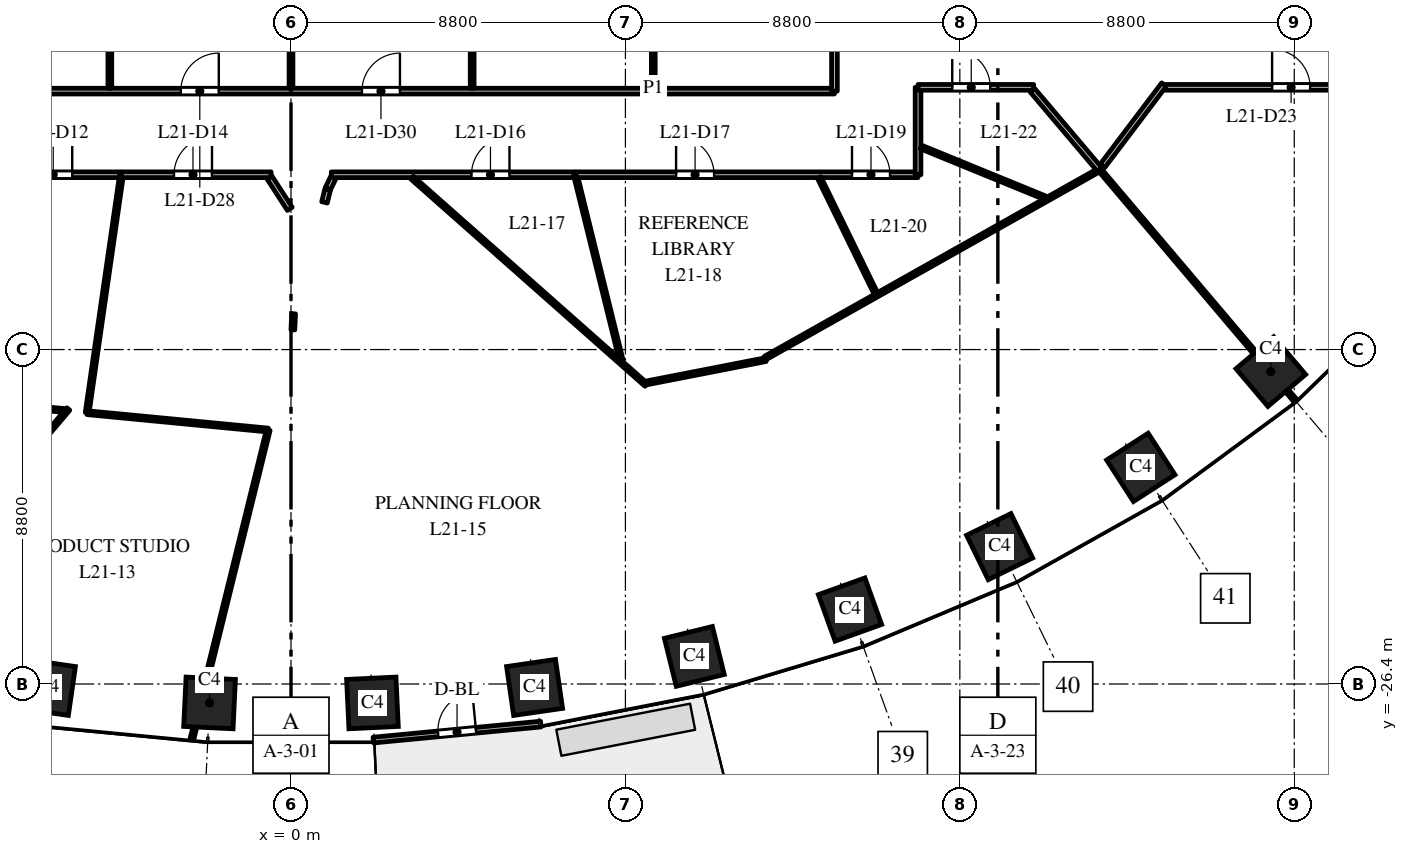
"""IFC4 building model, lengths in metres.
Left out: names, types, materials, properties, quantities, classifications, styles, units other than length and angle.
Written with IfcOpenShell. Run it as: python <this file> out.ifc"""

import sys

from ifc_helpers import new_model, si_unit, direction, frame, frame_2d, origin, origin_2d, place, context, subcontext, project, spatial, rectangle, extrude, element, fill, save


model = new_model("IFC4")
c1 = context("Model", 3, precision=1e-05, world=origin(), true_north=direction((0.0, 1.0)))
c2 = subcontext(c1, "Body", "Model", "MODEL_VIEW")
j1 = project(units=[si_unit("LENGTHUNIT", "METRE"), si_unit("PLANEANGLEUNIT", "RADIAN")], contexts=[c1])
p1 = place(None, origin())
s1 = spatial("IfcSite", under=j1, at=p1, CompositionType="ELEMENT")
p2 = place(p1, origin())
s2 = spatial("IfcBuilding", under=s1, at=p2, CompositionType="ELEMENT")
p3 = place(p2, frame((0.0, 0.0, 96.0)))
s3 = spatial("IfcBuildingStorey", under=s2, at=p3, CompositionType="ELEMENT", Elevation=96.0)
for number, where, z_axis, x_axis in (
    (1, (-6.409, -26.491, 0.0), (0.0, 0.0, 1.0), (0.99, -0.143, 0.0)),
    (2, (-2.143, -26.898, 0.0), (0.0, 0.0, 1.0), (0.999, -0.048, 0.0)),
    (3, (2.143, -26.898, 0.0), (0.0, 0.0, 1.0), (0.999, 0.048, 0.0)),
    (4, (6.409, -26.491, 0.0), (0.0, 0.0, 1.0), (0.99, 0.143, 0.0)),
    (5, (10.613, -25.674, 0.0), (0.0, 0.0, 1.0), (0.971, 0.24, 0.0)),
    (6, (14.709, -24.441, 0.0), (0.0, 0.0, 1.0), (0.941, 0.338, 0.0)),
    (7, (18.646, -22.785, 0.0), (0.0, 0.0, 1.0), (0.898, 0.439, 0.0)),
    (8, (22.362, -20.7, 0.0), (0.0, 0.0, 1.0), (0.84, 0.542, 0.0)),
    (9, (25.783, -18.18, 0.0), (0.0, 0.0, 1.0), (0.763, 0.646, 0.0)),
):
    element("IfcColumn", number, at=place(p3, frame(where, z_axis=z_axis, x_axis=x_axis)), inside=s3, PredefinedType="COLUMN", context=c2, shape_type="SweptSolid", body=[
        extrude(rectangle(XDim=1.3, YDim=1.3, at=origin_2d()), origin(), (0.0, 0.0, 1.0), 4.0),
    ])
p4 = place(p3, frame((2.166, -27.875, 0.0), z_axis=(0.0, 0.0, 1.0), x_axis=(0.995473879823, 0.095035543824, 0.0)))
e10 = element("IfcWall", 10, at=p4, inside=s3, PredefinedType="STANDARD", context=c2, shape_type="SweptSolid", body=[
    extrude(rectangle(XDim=4.426, YDim=0.15, at=frame_2d((2.213, 0.0))), origin(), (0.0, 0.0, 1.0), 3.7),
])
p5 = place(p4, frame((1.713, 0.0, 0.0)))
e11 = element("IfcOpeningElement", 11, at=p5, cuts=e10, PredefinedType="OPENING", context=c2, shape_type="SweptSolid", body=[
    extrude(rectangle(XDim=1.0, YDim=2.4, at=frame_2d((0.5, 1.2))), frame((0.0, 0.085, 0.0), z_axis=(0.0, -1.0, 0.0), x_axis=(1.0, 0.0, 0.0)), (0.0, 0.0, 1.0), 0.17),
])
p6 = place(p3, frame((-14.3, -10.8, 0.0), z_axis=(0.0, 0.0, 1.0), x_axis=(1.0, 0.0, 0.0)))
e12 = element("IfcWall", 12, at=p6, inside=s3, PredefinedType="PARTITIONING", context=c2, shape_type="SweptSolid", body=[
    extrude(rectangle(XDim=28.6, YDim=0.15, at=frame_2d((14.3, 0.0))), origin(), (0.0, 0.0, 1.0), 2.85),
])
p7 = place(p6, frame((11.4, 0.0, 0.0)))
e13 = element("IfcOpeningElement", 13, at=p7, cuts=e12, PredefinedType="OPENING", context=c2, shape_type="SweptSolid", body=[
    extrude(rectangle(XDim=1.0, YDim=2.1, at=frame_2d((0.5, 1.05))), frame((0.0, 0.085, 0.0), z_axis=(0.0, -1.0, 0.0), x_axis=(1.0, 0.0, 0.0)), (0.0, 0.0, 1.0), 0.17),
])
p8 = place(p6, frame((16.167, 0.0, 0.0)))
e14 = element("IfcOpeningElement", 14, at=p8, cuts=e12, PredefinedType="OPENING", context=c2, shape_type="SweptSolid", body=[
    extrude(rectangle(XDim=1.0, YDim=2.1, at=frame_2d((0.5, 1.05))), frame((0.0, 0.085, 0.0), z_axis=(0.0, -1.0, 0.0), x_axis=(1.0, 0.0, 0.0)), (0.0, 0.0, 1.0), 0.17),
])
p9 = place(p3, frame((-11.925, -26.323, 0.0), z_axis=(0.0, 0.0, 1.0), x_axis=(0.646476265577, 0.762934098101, 0.0)))
e15 = element("IfcWall", 15, at=p9, inside=s3, PredefinedType="PARTITIONING", context=c2, shape_type="SweptSolid", body=[
    extrude(rectangle(XDim=9.384, YDim=0.1, at=frame_2d((4.692, 0.0))), origin(), (0.0, 0.0, 1.0), 2.85),
])
p10 = place(p3, frame((-8.802, -18.932, 0.0), z_axis=(0.0, 0.0, 1.0), x_axis=(0.995447320833, -0.095313332995, 0.0)))
e16 = element("IfcWall", 16, at=p10, inside=s3, PredefinedType="PARTITIONING", context=c2, shape_type="SweptSolid", body=[
    extrude(rectangle(XDim=2.856, YDim=0.1, at=frame_2d((1.428, 0.0))), origin(), (0.0, 0.0, 1.0), 2.85),
])
p11 = place(p3, frame((-7.767, -13.0, 0.0), z_axis=(0.0, 0.0, 1.0), x_axis=(1.0, 0.0, 0.0)))
e17 = element("IfcWall", 17, at=p11, inside=s3, PredefinedType="PARTITIONING", context=c2, shape_type="SweptSolid", body=[
    extrude(rectangle(XDim=3.288, YDim=0.15, at=frame_2d((1.644, 0.0))), origin(), (0.0, 0.0, 1.0), 2.85),
])
p12 = place(p11, frame((1.01, 0.0, 0.0)))
e18 = element("IfcOpeningElement", 18, at=p12, cuts=e17, PredefinedType="OPENING", context=c2, shape_type="SweptSolid", body=[
    extrude(rectangle(XDim=1.0, YDim=2.1, at=frame_2d((0.5, 1.05))), frame((0.0, 0.085, 0.0), z_axis=(0.0, -1.0, 0.0), x_axis=(1.0, 0.0, 0.0)), (0.0, 0.0, 1.0), 0.17),
])
p13 = place(p3, frame((-5.364, -19.261, 0.0), z_axis=(0.0, 0.0, 1.0), x_axis=(0.142999851524, 0.989722709886, 0.0)))
e19 = element("IfcWall", 19, at=p13, inside=s3, PredefinedType="PARTITIONING", context=c2, shape_type="SweptSolid", body=[
    extrude(rectangle(XDim=6.322, YDim=0.1, at=frame_2d((3.161, 0.0))), origin(), (0.0, 0.0, 1.0), 3.7),
])
p14 = place(p3, frame((-5.364, -19.261, 0.0), z_axis=(0.0, 0.0, 1.0), x_axis=(0.995431522243, -0.09547818874, 0.0)))
e20 = element("IfcWall", 20, at=p14, inside=s3, PredefinedType="PARTITIONING", context=c2, shape_type="SweptSolid", body=[
    extrude(rectangle(XDim=4.787, YDim=0.1, at=frame_2d((2.394, 0.0))), origin(), (0.0, 0.0, 1.0), 2.85),
])
p15 = place(p3, frame((-4.767, -10.725, 0.0), z_axis=(0.0, 0.0, 1.0), x_axis=(0.0, 1.0, 0.0)))
e21 = element("IfcWall", 21, at=p15, inside=s3, PredefinedType="PARTITIONING", context=c2, shape_type="SweptSolid", body=[
    extrude(rectangle(XDim=4.362, YDim=0.1, at=frame_2d((2.181, 0.0))), origin(), (0.0, 0.0, 1.0), 2.9),
])
p16 = place(p3, frame((-4.459, -13.0, 0.0), z_axis=(0.0, 0.0, 1.0), x_axis=(1.0, 0.0, 0.0)))
e22 = element("IfcWall", 22, at=p16, inside=s3, PredefinedType="PARTITIONING", context=c2, shape_type="SweptSolid", body=[
    extrude(rectangle(XDim=3.936, YDim=0.15, at=frame_2d((1.968, 0.0))), origin(), (0.0, 0.0, 1.0), 2.85),
])
p17 = place(p16, frame((1.38, 0.0, 0.0)))
e23 = element("IfcOpeningElement", 23, at=p17, cuts=e22, PredefinedType="OPENING", context=c2, shape_type="SweptSolid", body=[
    extrude(rectangle(XDim=1.0, YDim=2.1, at=frame_2d((0.5, 1.05))), frame((0.0, 0.085, 0.0), z_axis=(0.0, -1.0, 0.0), x_axis=(1.0, 0.0, 0.0)), (0.0, 0.0, 1.0), 0.17),
])
p18 = place(p3, frame((-2.609, -27.858, 0.0), z_axis=(0.0, 0.0, 1.0), x_axis=(0.239677840558, 0.970852477334, 0.0)))
e24 = element("IfcWall", 24, at=p18, inside=s3, PredefinedType="PARTITIONING", context=c2, shape_type="SweptSolid", body=[
    extrude(rectangle(XDim=8.385, YDim=0.1, at=frame_2d((4.193, 0.0))), origin(), (0.0, 0.0, 1.0), 2.85),
])
p19 = place(p3, frame((-0.564, -13.075, 0.0), z_axis=(0.0, 0.0, 1.0), x_axis=(0.542858683931, -0.839824058527, 0.0)))
e25 = element("IfcWall", 25, at=p19, inside=s3, PredefinedType="PARTITIONING", context=c2, shape_type="SweptSolid", body=[
    extrude(rectangle(XDim=0.98, YDim=0.15, at=frame_2d((0.49, 0.0))), origin(), (0.0, 0.0, 1.0), 3.7),
])
p20 = place(p3, frame((0.0, -10.725, 0.0), z_axis=(0.0, 0.0, 1.0), x_axis=(0.0, 1.0, 0.0)))
e26 = element("IfcWall", 26, at=p20, inside=s3, PredefinedType="PARTITIONING", context=c2, shape_type="SweptSolid", body=[
    extrude(rectangle(XDim=3.221, YDim=0.1, at=frame_2d((1.611, 0.0))), origin(), (0.0, 0.0, 1.0), 3.7),
])
p21 = place(p3, frame((0.049, -17.081, 0.0), z_axis=(0.0, 0.0, 1.0), x_axis=(0.047263912187, 0.998882436829, 0.0)))
e27 = element("IfcWall", 27, at=p21, inside=s3, PredefinedType="PARTITIONING", context=c2, shape_type="SweptSolid", body=[
    extrude(rectangle(XDim=0.424, YDim=0.1, at=frame_2d((0.212, 0.0))), origin(), (0.0, 0.0, 1.0), 3.7),
])
p22 = place(p3, frame((0.881, -13.727, 0.0), z_axis=(0.0, 0.0, 1.0), x_axis=(0.239099704585, 0.970995021237, 0.0)))
e28 = element("IfcWall", 28, at=p22, inside=s3, PredefinedType="PARTITIONING", context=c2, shape_type="SweptSolid", body=[
    extrude(rectangle(XDim=0.351, YDim=0.15, at=frame_2d((0.176, 0.0))), origin(), (0.0, 0.0, 1.0), 3.7),
])
p23 = place(p3, frame((0.969, -13.369, 0.0), z_axis=(0.0, 0.0, 1.0), x_axis=(0.440240923942, 0.897879685084, 0.0)))
e29 = element("IfcWall", 29, at=p23, inside=s3, PredefinedType="PARTITIONING", context=c2, shape_type="SweptSolid", body=[
    extrude(rectangle(XDim=0.323, YDim=0.15, at=frame_2d((0.161, 0.0))), origin(), (0.0, 0.0, 1.0), 3.7),
])
p24 = place(p3, frame((1.061, -13.0, 0.0), z_axis=(0.0, 0.0, 1.0), x_axis=(1.0, 0.0, 0.0)))
e30 = element("IfcWall", 30, at=p24, inside=s3, PredefinedType="PARTITIONING", context=c2, shape_type="SweptSolid", body=[
    extrude(rectangle(XDim=6.422, YDim=0.15, at=frame_2d((3.211, 0.0))), origin(), (0.0, 0.0, 1.0), 2.85),
])
p25 = place(p24, frame((3.688, 0.0, 0.0)))
e31 = element("IfcOpeningElement", 31, at=p25, cuts=e30, PredefinedType="OPENING", context=c2, shape_type="SweptSolid", body=[
    extrude(rectangle(XDim=1.0, YDim=2.1, at=frame_2d((0.5, 1.05))), frame((0.0, 0.085, 0.0), z_axis=(0.0, -1.0, 0.0), x_axis=(1.0, 0.0, 0.0)), (0.0, 0.0, 1.0), 0.17),
])
p26 = place(p3, frame((3.187, -13.078, 0.0), z_axis=(0.0, 0.0, 1.0), x_axis=(0.748992031217, -0.662579004477, 0.0)))
e32 = element("IfcWall", 32, at=p26, inside=s3, PredefinedType="PARTITIONING", context=c2, shape_type="SweptSolid", body=[
    extrude(rectangle(XDim=8.227, YDim=0.1, at=frame_2d((4.114, 0.0))), origin(), (0.0, 0.0, 1.0), 2.85),
])
p27 = place(p3, frame((4.767, -10.725, 0.0), z_axis=(0.0, 0.0, 1.0), x_axis=(0.0, 1.0, 0.0)))
e33 = element("IfcWall", 33, at=p27, inside=s3, PredefinedType="PARTITIONING", context=c2, shape_type="SweptSolid", body=[
    extrude(rectangle(XDim=4.362, YDim=0.1, at=frame_2d((2.181, 0.0))), origin(), (0.0, 0.0, 1.0), 2.85),
])
p28 = place(p3, frame((7.483, -13.0, 0.0), z_axis=(0.0, 0.0, 1.0), x_axis=(0.239743843509, -0.970836180568, 0.0)))
e34 = element("IfcWall", 34, at=p28, inside=s3, PredefinedType="PARTITIONING", context=c2, shape_type="SweptSolid", body=[
    extrude(rectangle(XDim=5.022, YDim=0.1, at=frame_2d((2.511, 0.0))), origin(), (0.0, 0.0, 1.0), 3.7),
])
p29 = place(p3, frame((7.499, -13.0, 0.0), z_axis=(0.0, 0.0, 1.0), x_axis=(1.0, 0.0, 0.0)))
e35 = element("IfcWall", 35, at=p29, inside=s3, PredefinedType="PARTITIONING", context=c2, shape_type="SweptSolid", body=[
    extrude(rectangle(XDim=9.001, YDim=0.15, at=frame_2d((4.5, 0.0))), origin(), (0.0, 0.0, 1.0), 2.85),
])
p30 = place(p29, frame((2.634, 0.0, 0.0)))
e36 = element("IfcOpeningElement", 36, at=p30, cuts=e35, PredefinedType="OPENING", context=c2, shape_type="SweptSolid", body=[
    extrude(rectangle(XDim=1.0, YDim=2.1, at=frame_2d((0.5, 1.05))), frame((0.0, 0.085, 0.0), z_axis=(0.0, -1.0, 0.0), x_axis=(1.0, 0.0, 0.0)), (0.0, 0.0, 1.0), 0.17),
])
p31 = place(p29, frame((7.263, 0.0, 0.0)))
e37 = element("IfcOpeningElement", 37, at=p31, cuts=e35, PredefinedType="OPENING", context=c2, shape_type="SweptSolid", body=[
    extrude(rectangle(XDim=1.0, YDim=2.1, at=frame_2d((0.5, 1.05))), frame((0.0, 0.085, 0.0), z_axis=(0.0, -1.0, 0.0), x_axis=(1.0, 0.0, 0.0)), (0.0, 0.0, 1.0), 0.17),
])
p32 = place(p3, frame((9.364, -18.475, 0.0), z_axis=(0.0, 0.0, 1.0), x_axis=(0.98152602631, 0.191328669247, 0.0)))
e38 = element("IfcWall", 38, at=p32, inside=s3, PredefinedType="PARTITIONING", context=c2, shape_type="SweptSolid", body=[
    extrude(rectangle(XDim=3.189, YDim=0.1, at=frame_2d((1.594, 0.0))), origin(), (0.0, 0.0, 1.0), 2.85),
])
p33 = place(p3, frame((9.533, -10.725, 0.0), z_axis=(0.0, 0.0, 1.0), x_axis=(0.0, 1.0, 0.0)))
e39 = element("IfcWall", 39, at=p33, inside=s3, PredefinedType="PARTITIONING", context=c2, shape_type="SweptSolid", body=[
    extrude(rectangle(XDim=21.45, YDim=0.1, at=frame_2d((10.725, 0.0))), origin(), (0.0, 0.0, 1.0), 2.75),
])
p34 = place(p3, frame((12.478, -17.822, 0.0), z_axis=(0.0, 0.0, 1.0), x_axis=(0.871366973315, 0.490631835306, 0.0)))
e40 = element("IfcWall", 40, at=p34, inside=s3, PredefinedType="PARTITIONING", context=c2, shape_type="SweptSolid", body=[
    extrude(rectangle(XDim=10.101, YDim=0.1, at=frame_2d((5.051, 0.0))), origin(), (0.0, 0.0, 1.0), 3.7),
])
p35 = place(p3, frame((13.899, -13.075, 0.0), z_axis=(0.0, 0.0, 1.0), x_axis=(0.439170148288, -0.898403907412, 0.0)))
e41 = element("IfcWall", 41, at=p35, inside=s3, PredefinedType="PARTITIONING", context=c2, shape_type="SweptSolid", body=[
    extrude(rectangle(XDim=3.395, YDim=0.1, at=frame_2d((1.698, 0.0))), origin(), (0.0, 0.0, 1.0), 3.7),
])
p36 = place(p3, frame((14.3, -10.8, 0.0), z_axis=(0.0, 0.0, 1.0), x_axis=(0.0, 1.0, 0.0)))
e42 = element("IfcWall", 42, at=p36, inside=s3, PredefinedType="PARTITIONING", context=c2, shape_type="SweptSolid", body=[
    extrude(rectangle(XDim=21.6, YDim=0.15, at=frame_2d((10.8, 0.0))), origin(), (0.0, 0.0, 1.0), 2.75),
])
p37 = place(p36, frame((10.2, 0.0, 0.0)))
e43 = element("IfcOpeningElement", 43, at=p37, cuts=e42, PredefinedType="OPENING", context=c2, shape_type="SweptSolid", body=[
    extrude(rectangle(XDim=1.0, YDim=2.1, at=frame_2d((0.5, 1.05))), frame((0.0, 0.085, 0.0), z_axis=(0.0, -1.0, 0.0), x_axis=(1.0, 0.0, 0.0)), (0.0, 0.0, 1.0), 0.17),
])
p38 = place(p3, frame((16.5, -13.0, 0.0), z_axis=(0.0, 0.0, 1.0), x_axis=(0.0, 1.0, 0.0)))
e44 = element("IfcWall", 44, at=p38, inside=s3, PredefinedType="PARTITIONING", context=c2, shape_type="SweptSolid", body=[
    extrude(rectangle(XDim=2.3, YDim=0.15, at=frame_2d((1.15, 0.0))), origin(), (0.0, 0.0, 1.0), 3.7),
])
p39 = place(p3, frame((16.5, -10.7, 0.0), z_axis=(0.0, 0.0, 1.0), x_axis=(1.0, 0.0, 0.0)))
e45 = element("IfcWall", 45, at=p39, inside=s3, PredefinedType="PARTITIONING", context=c2, shape_type="SweptSolid", body=[
    extrude(rectangle(XDim=3.043, YDim=0.15, at=frame_2d((1.521, 0.0))), origin(), (0.0, 0.0, 1.0), 3.7),
])
p40 = place(p39, frame((0.9, 0.0, 0.0)))
e46 = element("IfcOpeningElement", 46, at=p40, cuts=e45, PredefinedType="OPENING", context=c2, shape_type="SweptSolid", body=[
    extrude(rectangle(XDim=1.0, YDim=2.1, at=frame_2d((0.5, 1.05))), frame((0.0, 0.085, 0.0), z_axis=(0.0, -1.0, 0.0), x_axis=(1.0, 0.0, 0.0)), (0.0, 0.0, 1.0), 0.17),
])
p41 = place(p3, frame((16.579, -12.271, 0.0), z_axis=(0.0, 0.0, 1.0), x_axis=(0.925511782592, -0.378718814272, 0.0)))
e47 = element("IfcWall", 47, at=p41, inside=s3, PredefinedType="PARTITIONING", context=c2, shape_type="SweptSolid", body=[
    extrude(rectangle(XDim=3.539, YDim=0.1, at=frame_2d((1.769, 0.0))), origin(), (0.0, 0.0, 1.0), 3.7),
])
p42 = place(p3, frame((19.511, -10.778, 0.0), z_axis=(0.0, 0.0, 1.0), x_axis=(0.64641426768, -0.762986628021, 0.0)))
e48 = element("IfcWall", 48, at=p42, inside=s3, PredefinedType="PARTITIONING", context=c2, shape_type="SweptSolid", body=[
    extrude(rectangle(XDim=2.735, YDim=0.15, at=frame_2d((1.368, 0.0))), origin(), (0.0, 0.0, 1.0), 3.7),
])
p43 = place(p3, frame((21.355, -12.765, 0.0), z_axis=(0.0, 0.0, 1.0), x_axis=(0.603391001626, 0.797445483502, 0.0)))
e49 = element("IfcWall", 49, at=p43, inside=s3, PredefinedType="PARTITIONING", context=c2, shape_type="SweptSolid", body=[
    extrude(rectangle(XDim=2.68, YDim=0.15, at=frame_2d((1.34, 0.0))), origin(), (0.0, 0.0, 1.0), 2.75),
])
p44 = place(p3, frame((21.279, -12.865, 0.0), z_axis=(0.0, 0.0, 1.0), x_axis=(0.646395355102, -0.763002650652, 0.0)))
e50 = element("IfcWall", 50, at=p44, inside=s3, PredefinedType="PARTITIONING", context=c2, shape_type="SweptSolid", body=[
    extrude(rectangle(XDim=7.969, YDim=0.1, at=frame_2d((3.984, 0.0))), origin(), (0.0, 0.0, 1.0), 2.9),
])
p45 = place(p3, frame((23.011, -10.7, 0.0), z_axis=(0.0, 0.0, 1.0), x_axis=(1.0, 0.0, 0.0)))
e51 = element("IfcWall", 51, at=p45, inside=s3, PredefinedType="PARTITIONING", context=c2, shape_type="SweptSolid", body=[
    extrude(rectangle(XDim=8.489, YDim=0.15, at=frame_2d((4.245, 0.0))), origin(), (0.0, 0.0, 1.0), 2.9),
])
p46 = place(p45, frame((2.806, 0.0, 0.0)))
e52 = element("IfcOpeningElement", 52, at=p46, cuts=e51, PredefinedType="OPENING", context=c2, shape_type="SweptSolid", body=[
    extrude(rectangle(XDim=1.0, YDim=2.1, at=frame_2d((0.5, 1.05))), frame((0.0, 0.085, 0.0), z_axis=(0.0, -1.0, 0.0), x_axis=(1.0, 0.0, 0.0)), (0.0, 0.0, 1.0), 0.17),
])
p47 = place(p5, origin())
e53 = element("IfcDoor", 53, at=p47, inside=s3, OperationType="SINGLE_SWING_RIGHT", PredefinedType="DOOR", context=c2, shape_type="SweptSolid", body=[
    extrude(rectangle(XDim=1.0, YDim=2.4, at=frame_2d((0.5, 1.2))), frame((0.0, 0.025, 0.0), z_axis=(0.0, -1.0, 0.0), x_axis=(1.0, 0.0, 0.0)), (0.0, 0.0, 1.0), 0.05),
])
fill(e11, e53)
p48 = place(p12, origin())
e54 = element("IfcDoor", 54, at=p48, inside=s3, OperationType="SINGLE_SWING_RIGHT", PredefinedType="DOOR", context=c2, shape_type="SweptSolid", body=[
    extrude(rectangle(XDim=1.0, YDim=2.1, at=frame_2d((0.5, 1.05))), frame((0.0, 0.025, 0.0), z_axis=(0.0, -1.0, 0.0), x_axis=(1.0, 0.0, 0.0)), (0.0, 0.0, 1.0), 0.05),
])
fill(e18, e54)
p49 = place(p17, origin())
e55 = element("IfcDoor", 55, at=p49, inside=s3, OperationType="SINGLE_SWING_RIGHT", PredefinedType="DOOR", context=c2, shape_type="SweptSolid", body=[
    extrude(rectangle(XDim=1.0, YDim=2.1, at=frame_2d((0.5, 1.05))), frame((0.0, 0.025, 0.0), z_axis=(0.0, -1.0, 0.0), x_axis=(1.0, 0.0, 0.0)), (0.0, 0.0, 1.0), 0.05),
])
fill(e23, e55)
p50 = place(p25, origin())
e56 = element("IfcDoor", 56, at=p50, inside=s3, OperationType="SINGLE_SWING_RIGHT", PredefinedType="DOOR", context=c2, shape_type="SweptSolid", body=[
    extrude(rectangle(XDim=1.0, YDim=2.1, at=frame_2d((0.5, 1.05))), frame((0.0, 0.025, 0.0), z_axis=(0.0, -1.0, 0.0), x_axis=(1.0, 0.0, 0.0)), (0.0, 0.0, 1.0), 0.05),
])
fill(e31, e56)
p51 = place(p30, origin())
e57 = element("IfcDoor", 57, at=p51, inside=s3, OperationType="SINGLE_SWING_LEFT", PredefinedType="DOOR", context=c2, shape_type="SweptSolid", body=[
    extrude(rectangle(XDim=1.0, YDim=2.1, at=frame_2d((0.5, 1.05))), frame((0.0, 0.025, 0.0), z_axis=(0.0, -1.0, 0.0), x_axis=(1.0, 0.0, 0.0)), (0.0, 0.0, 1.0), 0.05),
])
fill(e36, e57)
p52 = place(p31, origin())
e58 = element("IfcDoor", 58, at=p52, inside=s3, OperationType="SINGLE_SWING_LEFT", PredefinedType="DOOR", context=c2, shape_type="SweptSolid", body=[
    extrude(rectangle(XDim=1.0, YDim=2.1, at=frame_2d((0.5, 1.05))), frame((0.0, 0.025, 0.0), z_axis=(0.0, -1.0, 0.0), x_axis=(1.0, 0.0, 0.0)), (0.0, 0.0, 1.0), 0.05),
])
fill(e37, e58)
p53 = place(p40, origin())
e59 = element("IfcDoor", 59, at=p53, inside=s3, OperationType="SINGLE_SWING_LEFT", PredefinedType="DOOR", context=c2, shape_type="SweptSolid", body=[
    extrude(rectangle(XDim=1.0, YDim=2.1, at=frame_2d((0.5, 1.05))), frame((0.0, 0.025, 0.0), z_axis=(0.0, -1.0, 0.0), x_axis=(1.0, 0.0, 0.0)), (0.0, 0.0, 1.0), 0.05),
])
fill(e46, e59)
p54 = place(p46, origin())
e60 = element("IfcDoor", 60, at=p54, inside=s3, OperationType="SINGLE_SWING_LEFT", PredefinedType="DOOR", context=c2, shape_type="SweptSolid", body=[
    extrude(rectangle(XDim=1.0, YDim=2.1, at=frame_2d((0.5, 1.05))), frame((0.0, 0.025, 0.0), z_axis=(0.0, -1.0, 0.0), x_axis=(1.0, 0.0, 0.0)), (0.0, 0.0, 1.0), 0.05),
])
fill(e52, e60)
p55 = place(p7, origin())
e61 = element("IfcDoor", 61, at=p55, inside=s3, OperationType="SINGLE_SWING_RIGHT", PredefinedType="DOOR", context=c2, shape_type="SweptSolid", body=[
    extrude(rectangle(XDim=1.0, YDim=2.1, at=frame_2d((0.5, 1.05))), frame((0.0, 0.025, 0.0), z_axis=(0.0, -1.0, 0.0), x_axis=(1.0, 0.0, 0.0)), (0.0, 0.0, 1.0), 0.05),
])
fill(e13, e61)
p56 = place(p8, origin())
e62 = element("IfcDoor", 62, at=p56, inside=s3, OperationType="SINGLE_SWING_RIGHT", PredefinedType="DOOR", context=c2, shape_type="SweptSolid", body=[
    extrude(rectangle(XDim=1.0, YDim=2.1, at=frame_2d((0.5, 1.05))), frame((0.0, 0.025, 0.0), z_axis=(0.0, -1.0, 0.0), x_axis=(1.0, 0.0, 0.0)), (0.0, 0.0, 1.0), 0.05),
])
fill(e14, e62)
save(model, sys.argv[1])
